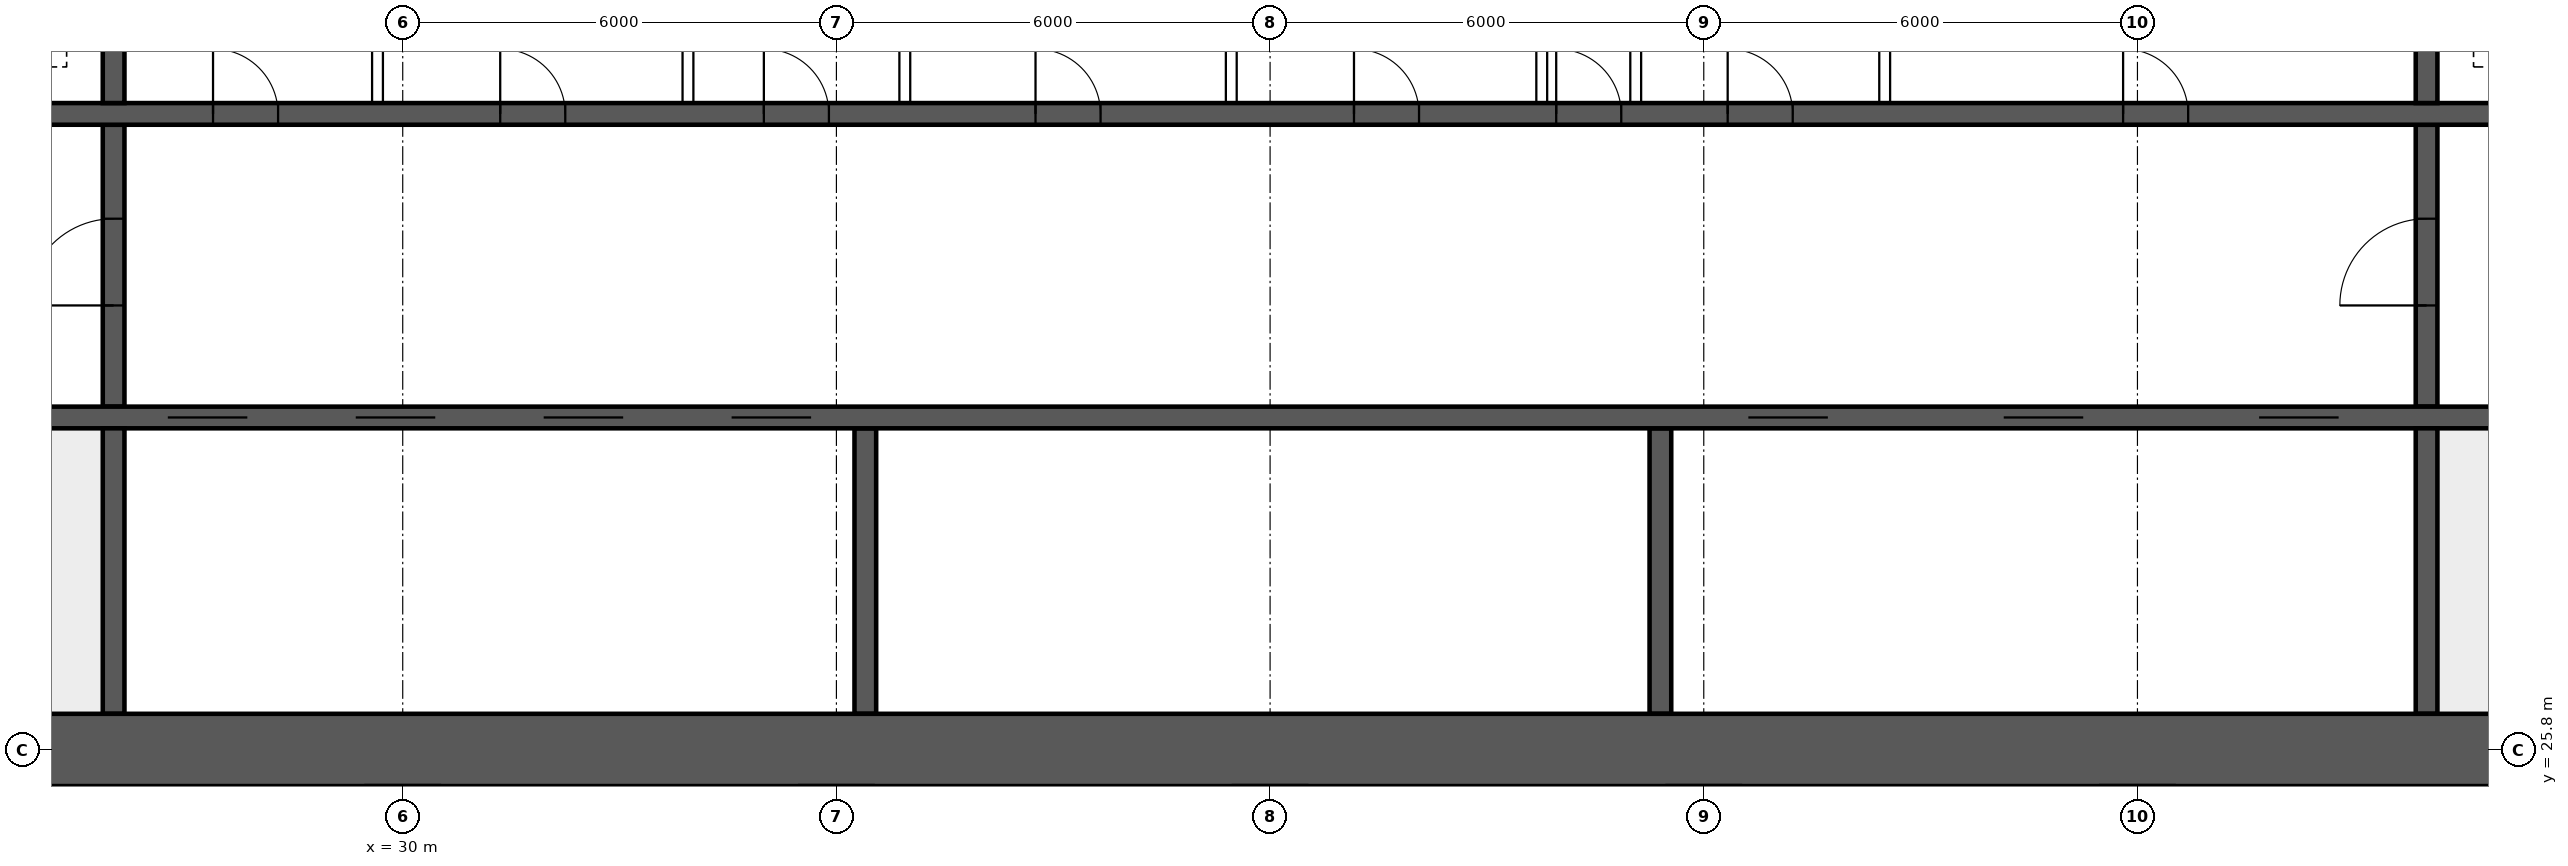
"""IFC4 building model, lengths in metres.
Left out: names, types, materials, properties, quantities, classifications, styles, units other than length and angle.
Written with IfcOpenShell. Run it as: python <this file> out.ifc"""

import sys

from ifc_helpers import new_model, si_unit, direction, frame, frame_2d, origin, place, context, subcontext, project, spatial, rectangle, extrude, element, fill, save


model = new_model("IFC4")
c1 = context("Model", 3, precision=1e-05, world=origin(), true_north=direction((0.0, 1.0)))
c2 = subcontext(c1, "Body", "Model", "MODEL_VIEW")
j1 = project(units=[si_unit("LENGTHUNIT", "METRE"), si_unit("PLANEANGLEUNIT", "RADIAN")], contexts=[c1])
p1 = place(None, origin())
s1 = spatial("IfcSite", under=j1, at=p1, CompositionType="ELEMENT")
p2 = place(p1, origin())
s2 = spatial("IfcBuilding", under=s1, at=p2, CompositionType="ELEMENT")
p3 = place(p2, frame((0.0, 0.0, 57.7)))
s3 = spatial("IfcBuildingStorey", under=s2, at=p3, CompositionType="ELEMENT", Elevation=57.7)
p4 = place(p3, frame((18.0, 25.8, 0.0), z_axis=(0.0, 0.0, 1.0), x_axis=(1.0, 0.0, 0.0)))
e1 = element("IfcWall", 1, at=p4, inside=s3, PredefinedType="SHEAR", context=c2, shape_type="SweptSolid", body=[
    extrude(rectangle(XDim=48.0, YDim=1.0, at=frame_2d((24.0, 0.0))), origin(), (0.0, 0.0, 1.0), 3.75),
])
p5 = place(p3, frame((18.5, 30.4, 0.0), z_axis=(0.0, 0.0, 1.0), x_axis=(1.0, 0.0, 0.0)))
e2 = element("IfcWall", 2, at=p5, inside=s3, PredefinedType="SHEAR", context=c2, shape_type="SweptSolid", body=[
    extrude(rectangle(XDim=47.0, YDim=0.3, at=frame_2d((23.5, 0.0))), origin(), (0.0, 0.0, 1.0), 3.75),
])
p6 = place(p5, frame((0.4, 0.0, 0.0)))
e3 = element("IfcOpeningElement", 3, at=p6, cuts=e2, PredefinedType="OPENING", context=c2, shape_type="SweptSolid", body=[
    extrude(rectangle(XDim=1.0, YDim=2.1, at=frame_2d((0.5, 1.05))), frame((0.0, 0.16, 0.0), z_axis=(0.0, -1.0, 0.0), x_axis=(1.0, 0.0, 0.0)), (0.0, 0.0, 1.0), 0.32),
])
p7 = place(p5, frame((45.6, 0.0, 0.0)))
e4 = element("IfcOpeningElement", 4, at=p7, cuts=e2, PredefinedType="OPENING", context=c2, shape_type="SweptSolid", body=[
    extrude(rectangle(XDim=1.0, YDim=2.1, at=frame_2d((0.5, 1.05))), frame((0.0, 0.16, 0.0), z_axis=(0.0, -1.0, 0.0), x_axis=(1.0, 0.0, 0.0)), (0.0, 0.0, 1.0), 0.32),
])
p8 = place(p5, frame((8.25, 0.0, 0.0)))
e5 = element("IfcOpeningElement", 5, at=p8, cuts=e2, PredefinedType="OPENING", context=c2, shape_type="SweptSolid", body=[
    extrude(rectangle(XDim=1.1, YDim=2.1, at=frame_2d((0.55, 1.05))), frame((0.0, 0.16, 0.0), z_axis=(0.0, -1.0, 0.0), x_axis=(1.0, 0.0, 0.0)), (0.0, 0.0, 1.0), 0.32),
])
p9 = place(p5, frame((10.85, 0.0, 0.0)))
e6 = element("IfcOpeningElement", 6, at=p9, cuts=e2, PredefinedType="OPENING", context=c2, shape_type="SweptSolid", body=[
    extrude(rectangle(XDim=1.1, YDim=2.1, at=frame_2d((0.55, 1.05))), frame((0.0, 0.16, 0.0), z_axis=(0.0, -1.0, 0.0), x_axis=(1.0, 0.0, 0.0)), (0.0, 0.0, 1.0), 0.32),
])
p10 = place(p5, frame((13.45, 0.0, 0.0)))
e7 = element("IfcOpeningElement", 7, at=p10, cuts=e2, PredefinedType="OPENING", context=c2, shape_type="SweptSolid", body=[
    extrude(rectangle(XDim=1.1, YDim=2.1, at=frame_2d((0.55, 1.05))), frame((0.0, 0.16, 0.0), z_axis=(0.0, -1.0, 0.0), x_axis=(1.0, 0.0, 0.0)), (0.0, 0.0, 1.0), 0.32),
])
p11 = place(p5, frame((16.05, 0.0, 0.0)))
e8 = element("IfcOpeningElement", 8, at=p11, cuts=e2, PredefinedType="OPENING", context=c2, shape_type="SweptSolid", body=[
    extrude(rectangle(XDim=1.1, YDim=2.1, at=frame_2d((0.55, 1.05))), frame((0.0, 0.16, 0.0), z_axis=(0.0, -1.0, 0.0), x_axis=(1.0, 0.0, 0.0)), (0.0, 0.0, 1.0), 0.32),
])
p12 = place(p5, frame((30.117, 0.0, 0.0)))
e9 = element("IfcOpeningElement", 9, at=p12, cuts=e2, PredefinedType="OPENING", context=c2, shape_type="SweptSolid", body=[
    extrude(rectangle(XDim=1.1, YDim=2.1, at=frame_2d((0.55, 1.05))), frame((0.0, 0.16, 0.0), z_axis=(0.0, -1.0, 0.0), x_axis=(1.0, 0.0, 0.0)), (0.0, 0.0, 1.0), 0.32),
])
p13 = place(p5, frame((33.65, 0.0, 0.0)))
e10 = element("IfcOpeningElement", 10, at=p13, cuts=e2, PredefinedType="OPENING", context=c2, shape_type="SweptSolid", body=[
    extrude(rectangle(XDim=1.1, YDim=2.1, at=frame_2d((0.55, 1.05))), frame((0.0, 0.16, 0.0), z_axis=(0.0, -1.0, 0.0), x_axis=(1.0, 0.0, 0.0)), (0.0, 0.0, 1.0), 0.32),
])
p14 = place(p5, frame((37.183, 0.0, 0.0)))
e11 = element("IfcOpeningElement", 11, at=p14, cuts=e2, PredefinedType="OPENING", context=c2, shape_type="SweptSolid", body=[
    extrude(rectangle(XDim=1.1, YDim=2.1, at=frame_2d((0.55, 1.05))), frame((0.0, 0.16, 0.0), z_axis=(0.0, -1.0, 0.0), x_axis=(1.0, 0.0, 0.0)), (0.0, 0.0, 1.0), 0.32),
])
p15 = place(p3, frame((18.5, 34.6, 0.0), z_axis=(0.0, 0.0, 1.0), x_axis=(1.0, 0.0, 0.0)))
e12 = element("IfcWall", 12, at=p15, inside=s3, PredefinedType="SHEAR", context=c2, shape_type="SweptSolid", body=[
    extrude(rectangle(XDim=47.0, YDim=0.3, at=frame_2d((23.5, 0.0))), origin(), (0.0, 0.0, 1.0), 3.75),
])
p16 = place(p15, frame((0.9, 0.0, 0.0)))
e13 = element("IfcOpeningElement", 13, at=p16, cuts=e12, PredefinedType="OPENING", context=c2, shape_type="SweptSolid", body=[
    extrude(rectangle(XDim=1.1, YDim=2.1, at=frame_2d((0.55, 1.05))), frame((0.0, 0.16, 0.0), z_axis=(0.0, -1.0, 0.0), x_axis=(1.0, 0.0, 0.0)), (0.0, 0.0, 1.0), 0.32),
])
p17 = place(p15, frame((45.0, 0.0, 0.0)))
e14 = element("IfcOpeningElement", 14, at=p17, cuts=e12, PredefinedType="OPENING", context=c2, shape_type="SweptSolid", body=[
    extrude(rectangle(XDim=1.1, YDim=2.1, at=frame_2d((0.55, 1.05))), frame((0.0, 0.16, 0.0), z_axis=(0.0, -1.0, 0.0), x_axis=(1.0, 0.0, 0.0)), (0.0, 0.0, 1.0), 0.32),
])
p18 = place(p15, frame((4.1, 0.0, 0.0)))
e15 = element("IfcOpeningElement", 15, at=p18, cuts=e12, PredefinedType="OPENING", context=c2, shape_type="SweptSolid", body=[
    extrude(rectangle(XDim=0.9, YDim=2.1, at=frame_2d((0.45, 1.05))), frame((0.0, 0.16, 0.0), z_axis=(0.0, -1.0, 0.0), x_axis=(1.0, 0.0, 0.0)), (0.0, 0.0, 1.0), 0.32),
])
p19 = place(p15, frame((42.0, 0.0, 0.0)))
e16 = element("IfcOpeningElement", 16, at=p19, cuts=e12, PredefinedType="OPENING", context=c2, shape_type="SweptSolid", body=[
    extrude(rectangle(XDim=0.9, YDim=2.1, at=frame_2d((0.45, 1.05))), frame((0.0, 0.16, 0.0), z_axis=(0.0, -1.0, 0.0), x_axis=(1.0, 0.0, 0.0)), (0.0, 0.0, 1.0), 0.32),
])
p20 = place(p15, frame((8.875, 0.0, 0.0)))
e17 = element("IfcOpeningElement", 17, at=p20, cuts=e12, PredefinedType="OPENING", context=c2, shape_type="SweptSolid", body=[
    extrude(rectangle(XDim=0.9, YDim=2.1, at=frame_2d((0.45, 1.05))), frame((0.0, 0.16, 0.0), z_axis=(0.0, -1.0, 0.0), x_axis=(1.0, 0.0, 0.0)), (0.0, 0.0, 1.0), 0.32),
])
p21 = place(p15, frame((12.849, 0.0, 0.0)))
e18 = element("IfcOpeningElement", 18, at=p21, cuts=e12, PredefinedType="OPENING", context=c2, shape_type="SweptSolid", body=[
    extrude(rectangle(XDim=0.9, YDim=2.1, at=frame_2d((0.45, 1.05))), frame((0.0, 0.16, 0.0), z_axis=(0.0, -1.0, 0.0), x_axis=(1.0, 0.0, 0.0)), (0.0, 0.0, 1.0), 0.32),
])
p22 = place(p15, frame((16.496, 0.0, 0.0)))
e19 = element("IfcOpeningElement", 19, at=p22, cuts=e12, PredefinedType="OPENING", context=c2, shape_type="SweptSolid", body=[
    extrude(rectangle(XDim=0.9, YDim=2.1, at=frame_2d((0.45, 1.05))), frame((0.0, 0.16, 0.0), z_axis=(0.0, -1.0, 0.0), x_axis=(1.0, 0.0, 0.0)), (0.0, 0.0, 1.0), 0.32),
])
p23 = place(p15, frame((20.255, 0.0, 0.0)))
e20 = element("IfcOpeningElement", 20, at=p23, cuts=e12, PredefinedType="OPENING", context=c2, shape_type="SweptSolid", body=[
    extrude(rectangle(XDim=0.9, YDim=2.1, at=frame_2d((0.45, 1.05))), frame((0.0, 0.16, 0.0), z_axis=(0.0, -1.0, 0.0), x_axis=(1.0, 0.0, 0.0)), (0.0, 0.0, 1.0), 0.32),
])
p24 = place(p15, frame((24.661, 0.0, 0.0)))
e21 = element("IfcOpeningElement", 21, at=p24, cuts=e12, PredefinedType="OPENING", context=c2, shape_type="SweptSolid", body=[
    extrude(rectangle(XDim=0.9, YDim=2.1, at=frame_2d((0.45, 1.05))), frame((0.0, 0.16, 0.0), z_axis=(0.0, -1.0, 0.0), x_axis=(1.0, 0.0, 0.0)), (0.0, 0.0, 1.0), 0.32),
])
p25 = place(p15, frame((27.458, 0.0, 0.0)))
e22 = element("IfcOpeningElement", 22, at=p25, cuts=e12, PredefinedType="OPENING", context=c2, shape_type="SweptSolid", body=[
    extrude(rectangle(XDim=0.9, YDim=2.1, at=frame_2d((0.45, 1.05))), frame((0.0, 0.16, 0.0), z_axis=(0.0, -1.0, 0.0), x_axis=(1.0, 0.0, 0.0)), (0.0, 0.0, 1.0), 0.32),
])
p26 = place(p15, frame((29.831, 0.0, 0.0)))
e23 = element("IfcOpeningElement", 23, at=p26, cuts=e12, PredefinedType="OPENING", context=c2, shape_type="SweptSolid", body=[
    extrude(rectangle(XDim=0.9, YDim=2.1, at=frame_2d((0.45, 1.05))), frame((0.0, 0.16, 0.0), z_axis=(0.0, -1.0, 0.0), x_axis=(1.0, 0.0, 0.0)), (0.0, 0.0, 1.0), 0.32),
])
p27 = place(p15, frame((35.302, 0.0, 0.0)))
e24 = element("IfcOpeningElement", 24, at=p27, cuts=e12, PredefinedType="OPENING", context=c2, shape_type="SweptSolid", body=[
    extrude(rectangle(XDim=0.9, YDim=2.1, at=frame_2d((0.45, 1.05))), frame((0.0, 0.16, 0.0), z_axis=(0.0, -1.0, 0.0), x_axis=(1.0, 0.0, 0.0)), (0.0, 0.0, 1.0), 0.32),
])
for number, where, z_axis, x_axis in (
    (25, (26.0, 26.3, 0.0), (0.0, 0.0, 1.0), (0.0, 1.0, 0.0)),
    (26, (58.0, 26.3, 0.0), (0.0, 0.0, 1.0), (0.0, 1.0, 0.0)),
):
    element("IfcWall", number, at=place(p3, frame(where, z_axis=z_axis, x_axis=x_axis)), inside=s3, PredefinedType="SHEAR", context=c2, shape_type="SweptSolid", body=[
        extrude(rectangle(XDim=3.95, YDim=0.3, at=frame_2d((1.975, 0.0))), origin(), (0.0, 0.0, 1.0), 3.75),
    ])
p28 = place(p3, frame((26.0, 30.55, 0.0), z_axis=(0.0, 0.0, 1.0), x_axis=(0.0, 1.0, 0.0)))
e27 = element("IfcWall", 27, at=p28, inside=s3, PredefinedType="SHEAR", context=c2, shape_type="SweptSolid", body=[
    extrude(rectangle(XDim=3.9, YDim=0.3, at=frame_2d((1.95, 0.0))), origin(), (0.0, 0.0, 1.0), 3.75),
])
p29 = place(p28, frame((1.4, 0.0, 0.0)))
e28 = element("IfcOpeningElement", 28, at=p29, cuts=e27, PredefinedType="OPENING", context=c2, shape_type="SweptSolid", body=[
    extrude(rectangle(XDim=1.2, YDim=2.1, at=frame_2d((0.6, 1.05))), frame((0.0, 0.16, 0.0), z_axis=(0.0, -1.0, 0.0), x_axis=(1.0, 0.0, 0.0)), (0.0, 0.0, 1.0), 0.32),
])
p30 = place(p3, frame((58.0, 30.55, 0.0), z_axis=(0.0, 0.0, 1.0), x_axis=(0.0, 1.0, 0.0)))
e29 = element("IfcWall", 29, at=p30, inside=s3, PredefinedType="SHEAR", context=c2, shape_type="SweptSolid", body=[
    extrude(rectangle(XDim=3.9, YDim=0.3, at=frame_2d((1.95, 0.0))), origin(), (0.0, 0.0, 1.0), 3.75),
])
p31 = place(p30, frame((1.4, 0.0, 0.0)))
e30 = element("IfcOpeningElement", 30, at=p31, cuts=e29, PredefinedType="OPENING", context=c2, shape_type="SweptSolid", body=[
    extrude(rectangle(XDim=1.2, YDim=2.1, at=frame_2d((0.6, 1.05))), frame((0.0, 0.16, 0.0), z_axis=(0.0, -1.0, 0.0), x_axis=(1.0, 0.0, 0.0)), (0.0, 0.0, 1.0), 0.32),
])
for number, where, z_axis, x_axis in (
    (31, (26.0, 34.75, 0.0), (0.0, 0.0, 1.0), (0.0, 1.0, 0.0)),
    (32, (58.0, 34.75, 0.0), (0.0, 0.0, 1.0), (0.0, 1.0, 0.0)),
):
    element("IfcWall", number, at=place(p3, frame(where, z_axis=z_axis, x_axis=x_axis)), inside=s3, PredefinedType="SHEAR", context=c2, shape_type="SweptSolid", body=[
        extrude(rectangle(XDim=2.95, YDim=0.3, at=frame_2d((1.475, 0.0))), origin(), (0.0, 0.0, 1.0), 3.75),
    ])
for number, where, z_axis, x_axis in (
    (33, (36.4, 26.3, 0.0), (0.0, 0.0, 1.0), (0.0, 1.0, 0.0)),
    (34, (47.4, 26.3, 0.0), (0.0, 0.0, 1.0), (0.0, 1.0, 0.0)),
):
    element("IfcWall", number, at=place(p3, frame(where, z_axis=z_axis, x_axis=x_axis)), inside=s3, PredefinedType="SHEAR", context=c2, shape_type="SweptSolid", body=[
        extrude(rectangle(XDim=3.95, YDim=0.3, at=frame_2d((1.975, 0.0))), origin(), (0.0, 0.0, 1.0), 3.75),
    ])
for number, where, z_axis, x_axis in (
    (35, (29.651, 34.75, 0.0), (0.0, 0.0, 1.0), (0.0, 1.0, 0.0)),
    (36, (33.946, 34.75, 0.0), (0.0, 0.0, 1.0), (0.0, 1.0, 0.0)),
    (37, (36.946, 34.75, 0.0), (0.0, 0.0, 1.0), (0.0, 1.0, 0.0)),
    (38, (41.463, 34.75, 0.0), (0.0, 0.0, 1.0), (0.0, 1.0, 0.0)),
    (39, (45.758, 34.75, 0.0), (0.0, 0.0, 1.0), (0.0, 1.0, 0.0)),
    (40, (47.058, 34.75, 0.0), (0.0, 0.0, 1.0), (0.0, 1.0, 0.0)),
    (41, (50.503, 34.75, 0.0), (0.0, 0.0, 1.0), (0.0, 1.0, 0.0)),
):
    element("IfcWall", number, at=place(p3, frame(where, z_axis=z_axis, x_axis=x_axis)), inside=s3, PredefinedType="SOLIDWALL", context=c2, shape_type="SweptSolid", body=[
        extrude(rectangle(XDim=2.95, YDim=0.15, at=frame_2d((1.475, 0.0))), origin(), (0.0, 0.0, 1.0), 3.5),
    ])
for number, where, z_axis, x_axis in (
    (42, (39.075, 14.9, 0.0), (0.0, 0.0, 1.0), (0.0, 1.0, 0.0)),
    (43, (45.21, 14.9, 0.0), (0.0, 0.0, 1.0), (0.0, 1.0, 0.0)),
    (44, (56.78, 14.9, 0.0), (0.0, 0.0, 1.0), (0.0, 1.0, 0.0)),
):
    element("IfcWall", number, at=place(p3, frame(where, z_axis=z_axis, x_axis=x_axis)), inside=s3, PredefinedType="PARTITIONING", context=c2, shape_type="SweptSolid", body=[
        extrude(rectangle(XDim=10.4, YDim=0.15, at=frame_2d((5.2, 0.0))), origin(), (0.0, 0.0, 1.0), 3.5),
    ])
p32 = place(p29, origin())
e45 = element("IfcDoor", 45, at=p32, inside=s3, OperationType="SINGLE_SWING_LEFT", PredefinedType="DOOR", context=c2, shape_type="SweptSolid", body=[
    extrude(rectangle(XDim=1.2, YDim=2.1, at=frame_2d((0.6, 1.05))), frame((0.0, 0.025, 0.0), z_axis=(0.0, -1.0, 0.0), x_axis=(1.0, 0.0, 0.0)), (0.0, 0.0, 1.0), 0.05),
])
fill(e28, e45)
p33 = place(p31, origin())
e46 = element("IfcDoor", 46, at=p33, inside=s3, OperationType="SINGLE_SWING_LEFT", PredefinedType="DOOR", context=c2, shape_type="SweptSolid", body=[
    extrude(rectangle(XDim=1.2, YDim=2.1, at=frame_2d((0.6, 1.05))), frame((0.0, 0.025, 0.0), z_axis=(0.0, -1.0, 0.0), x_axis=(1.0, 0.0, 0.0)), (0.0, 0.0, 1.0), 0.05),
])
fill(e30, e46)
p34 = place(p20, origin())
e47 = element("IfcDoor", 47, at=p34, inside=s3, OperationType="SINGLE_SWING_LEFT", PredefinedType="DOOR", context=c2, shape_type="SweptSolid", body=[
    extrude(rectangle(XDim=0.9, YDim=2.1, at=frame_2d((0.45, 1.05))), frame((0.0, 0.025, 0.0), z_axis=(0.0, -1.0, 0.0), x_axis=(1.0, 0.0, 0.0)), (0.0, 0.0, 1.0), 0.05),
])
fill(e17, e47)
p35 = place(p21, origin())
e48 = element("IfcDoor", 48, at=p35, inside=s3, OperationType="SINGLE_SWING_LEFT", PredefinedType="DOOR", context=c2, shape_type="SweptSolid", body=[
    extrude(rectangle(XDim=0.9, YDim=2.1, at=frame_2d((0.45, 1.05))), frame((0.0, 0.025, 0.0), z_axis=(0.0, -1.0, 0.0), x_axis=(1.0, 0.0, 0.0)), (0.0, 0.0, 1.0), 0.05),
])
fill(e18, e48)
p36 = place(p22, origin())
e49 = element("IfcDoor", 49, at=p36, inside=s3, OperationType="SINGLE_SWING_LEFT", PredefinedType="DOOR", context=c2, shape_type="SweptSolid", body=[
    extrude(rectangle(XDim=0.9, YDim=2.1, at=frame_2d((0.45, 1.05))), frame((0.0, 0.025, 0.0), z_axis=(0.0, -1.0, 0.0), x_axis=(1.0, 0.0, 0.0)), (0.0, 0.0, 1.0), 0.05),
])
fill(e19, e49)
p37 = place(p23, origin())
e50 = element("IfcDoor", 50, at=p37, inside=s3, OperationType="SINGLE_SWING_LEFT", PredefinedType="DOOR", context=c2, shape_type="SweptSolid", body=[
    extrude(rectangle(XDim=0.9, YDim=2.1, at=frame_2d((0.45, 1.05))), frame((0.0, 0.025, 0.0), z_axis=(0.0, -1.0, 0.0), x_axis=(1.0, 0.0, 0.0)), (0.0, 0.0, 1.0), 0.05),
])
fill(e20, e50)
p38 = place(p24, origin())
e51 = element("IfcDoor", 51, at=p38, inside=s3, OperationType="SINGLE_SWING_LEFT", PredefinedType="DOOR", context=c2, shape_type="SweptSolid", body=[
    extrude(rectangle(XDim=0.9, YDim=2.1, at=frame_2d((0.45, 1.05))), frame((0.0, 0.025, 0.0), z_axis=(0.0, -1.0, 0.0), x_axis=(1.0, 0.0, 0.0)), (0.0, 0.0, 1.0), 0.05),
])
fill(e21, e51)
p39 = place(p25, origin())
e52 = element("IfcDoor", 52, at=p39, inside=s3, OperationType="SINGLE_SWING_LEFT", PredefinedType="DOOR", context=c2, shape_type="SweptSolid", body=[
    extrude(rectangle(XDim=0.9, YDim=2.1, at=frame_2d((0.45, 1.05))), frame((0.0, 0.025, 0.0), z_axis=(0.0, -1.0, 0.0), x_axis=(1.0, 0.0, 0.0)), (0.0, 0.0, 1.0), 0.05),
])
fill(e22, e52)
p40 = place(p26, origin())
e53 = element("IfcDoor", 53, at=p40, inside=s3, OperationType="SINGLE_SWING_LEFT", PredefinedType="DOOR", context=c2, shape_type="SweptSolid", body=[
    extrude(rectangle(XDim=0.9, YDim=2.1, at=frame_2d((0.45, 1.05))), frame((0.0, 0.025, 0.0), z_axis=(0.0, -1.0, 0.0), x_axis=(1.0, 0.0, 0.0)), (0.0, 0.0, 1.0), 0.05),
])
fill(e23, e53)
p41 = place(p27, origin())
e54 = element("IfcDoor", 54, at=p41, inside=s3, OperationType="SINGLE_SWING_LEFT", PredefinedType="DOOR", context=c2, shape_type="SweptSolid", body=[
    extrude(rectangle(XDim=0.9, YDim=2.1, at=frame_2d((0.45, 1.05))), frame((0.0, 0.025, 0.0), z_axis=(0.0, -1.0, 0.0), x_axis=(1.0, 0.0, 0.0)), (0.0, 0.0, 1.0), 0.05),
])
fill(e24, e54)
p42 = place(p8, origin())
e55 = element("IfcDoor", 55, at=p42, inside=s3, OperationType="DOUBLE_DOOR_SLIDING", PredefinedType="DOOR", context=c2, shape_type="SweptSolid", body=[
    extrude(rectangle(XDim=1.1, YDim=2.1, at=frame_2d((0.55, 1.05))), frame((0.0, 0.025, 0.0), z_axis=(0.0, -1.0, 0.0), x_axis=(1.0, 0.0, 0.0)), (0.0, 0.0, 1.0), 0.05),
])
fill(e5, e55)
p43 = place(p9, origin())
e56 = element("IfcDoor", 56, at=p43, inside=s3, OperationType="DOUBLE_DOOR_SLIDING", PredefinedType="DOOR", context=c2, shape_type="SweptSolid", body=[
    extrude(rectangle(XDim=1.1, YDim=2.1, at=frame_2d((0.55, 1.05))), frame((0.0, 0.025, 0.0), z_axis=(0.0, -1.0, 0.0), x_axis=(1.0, 0.0, 0.0)), (0.0, 0.0, 1.0), 0.05),
])
fill(e6, e56)
p44 = place(p10, origin())
e57 = element("IfcDoor", 57, at=p44, inside=s3, OperationType="DOUBLE_DOOR_SLIDING", PredefinedType="DOOR", context=c2, shape_type="SweptSolid", body=[
    extrude(rectangle(XDim=1.1, YDim=2.1, at=frame_2d((0.55, 1.05))), frame((0.0, 0.025, 0.0), z_axis=(0.0, -1.0, 0.0), x_axis=(1.0, 0.0, 0.0)), (0.0, 0.0, 1.0), 0.05),
])
fill(e7, e57)
p45 = place(p11, origin())
e58 = element("IfcDoor", 58, at=p45, inside=s3, OperationType="DOUBLE_DOOR_SLIDING", PredefinedType="DOOR", context=c2, shape_type="SweptSolid", body=[
    extrude(rectangle(XDim=1.1, YDim=2.1, at=frame_2d((0.55, 1.05))), frame((0.0, 0.025, 0.0), z_axis=(0.0, -1.0, 0.0), x_axis=(1.0, 0.0, 0.0)), (0.0, 0.0, 1.0), 0.05),
])
fill(e8, e58)
p46 = place(p12, origin())
e59 = element("IfcDoor", 59, at=p46, inside=s3, OperationType="DOUBLE_DOOR_SLIDING", PredefinedType="DOOR", context=c2, shape_type="SweptSolid", body=[
    extrude(rectangle(XDim=1.1, YDim=2.1, at=frame_2d((0.55, 1.05))), frame((0.0, 0.025, 0.0), z_axis=(0.0, -1.0, 0.0), x_axis=(1.0, 0.0, 0.0)), (0.0, 0.0, 1.0), 0.05),
])
fill(e9, e59)
p47 = place(p13, origin())
e60 = element("IfcDoor", 60, at=p47, inside=s3, OperationType="DOUBLE_DOOR_SLIDING", PredefinedType="DOOR", context=c2, shape_type="SweptSolid", body=[
    extrude(rectangle(XDim=1.1, YDim=2.1, at=frame_2d((0.55, 1.05))), frame((0.0, 0.025, 0.0), z_axis=(0.0, -1.0, 0.0), x_axis=(1.0, 0.0, 0.0)), (0.0, 0.0, 1.0), 0.05),
])
fill(e10, e60)
p48 = place(p14, origin())
e61 = element("IfcDoor", 61, at=p48, inside=s3, OperationType="DOUBLE_DOOR_SLIDING", PredefinedType="DOOR", context=c2, shape_type="SweptSolid", body=[
    extrude(rectangle(XDim=1.1, YDim=2.1, at=frame_2d((0.55, 1.05))), frame((0.0, 0.025, 0.0), z_axis=(0.0, -1.0, 0.0), x_axis=(1.0, 0.0, 0.0)), (0.0, 0.0, 1.0), 0.05),
])
fill(e11, e61)
save(model, sys.argv[1])
